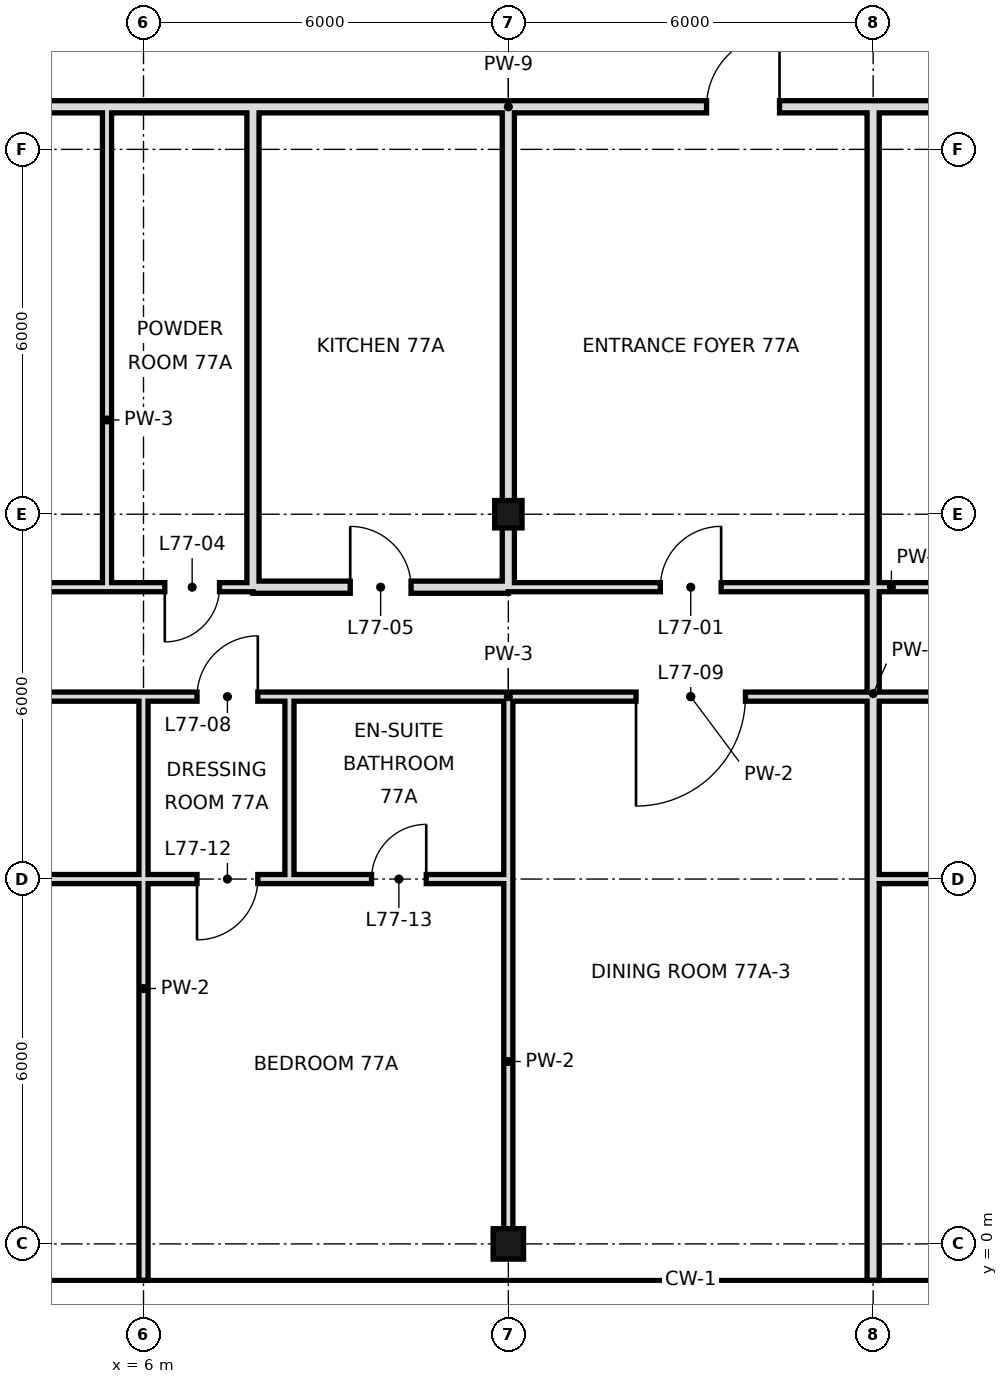
"""IFC4 building model, lengths in metres.
Left out: names, types, materials, properties, quantities, classifications, styles, units other than length and angle.
Written with IfcOpenShell. Run it as: python <this file> out.ifc"""

import sys

from ifc_helpers import new_model, si_unit, direction, frame, frame_2d, origin, origin_2d, place, context, subcontext, project, spatial, rectangle, hollow_rectangle, extrude, element, fill, save


model = new_model("IFC4")
c1 = context("Model", 3, precision=1e-05, world=origin(), true_north=direction((0.0, 1.0)))
c2 = subcontext(c1, "Body", "Model", "MODEL_VIEW")
j1 = project(units=[si_unit("LENGTHUNIT", "METRE"), si_unit("PLANEANGLEUNIT", "RADIAN")], contexts=[c1])
p1 = place(None, origin())
s1 = spatial("IfcSite", under=j1, at=p1, CompositionType="ELEMENT")
p2 = place(p1, origin())
s2 = spatial("IfcBuilding", under=s1, at=p2, CompositionType="ELEMENT")
p3 = place(p2, frame((0.0, 0.0, 323.2)))
s3 = spatial("IfcBuildingStorey", under=s2, at=p3, CompositionType="ELEMENT", Elevation=323.2)
p4 = place(p3, frame((12.0, 0.0, 0.0), z_axis=(0.0, 0.0, 1.0), x_axis=(1.0, 0.0, 0.0)))
e1 = element("IfcColumn", 1, at=p4, inside=s3, PredefinedType="COLUMN", context=c2, shape_type="SweptSolid", body=[
    extrude(hollow_rectangle(XDim=0.5, YDim=0.5, WallThickness=0.025, at=origin_2d()), origin(), (0.0, 0.0, 1.0), 3.6),
])
p5 = place(p3, frame((12.0, 12.0, 0.0), z_axis=(0.0, 0.0, 1.0), x_axis=(1.0, 0.0, 0.0)))
e2 = element("IfcColumn", 2, at=p5, inside=s3, PredefinedType="COLUMN", context=c2, shape_type="SweptSolid", body=[
    extrude(hollow_rectangle(XDim=0.45, YDim=0.45, WallThickness=0.022, at=origin_2d()), origin(), (0.0, 0.0, 1.0), 3.6),
])
p6 = place(p3, frame((12.0, 10.8, 0.0), z_axis=(0.0, 0.0, 1.0), x_axis=(0.0, 1.0, 0.0)))
e3 = element("IfcWall", 3, at=p6, inside=s3, PredefinedType="SOLIDWALL", context=c2, shape_type="SweptSolid", body=[
    extrude(rectangle(XDim=7.9, YDim=0.2, at=frame_2d((3.95, 0.0))), origin(), (0.0, 0.0, 1.0), 2.72),
])
p7 = place(p3, frame((12.0, 0.0, 0.0), z_axis=(0.0, 0.0, 1.0), x_axis=(0.0, 1.0, 0.0)))
e4 = element("IfcWall", 4, at=p7, inside=s3, PredefinedType="PARTITIONING", context=c2, shape_type="SweptSolid", body=[
    extrude(rectangle(XDim=6.0, YDim=0.15, at=frame_2d((3.0, 0.0))), origin(), (0.0, 0.0, 1.0), 2.72),
])
p8 = place(p3, frame((12.0, 6.0, 0.0), z_axis=(0.0, 0.0, 1.0), x_axis=(0.0, 1.0, 0.0)))
e5 = element("IfcWall", 5, at=p8, inside=s3, PredefinedType="PARTITIONING", context=c2, shape_type="SweptSolid", body=[
    extrude(rectangle(XDim=3.0, YDim=0.15, at=frame_2d((1.5, 0.0))), origin(), (0.0, 0.0, 1.0), 2.72),
])
p9 = place(p3, frame((18.0, -0.6, 0.0), z_axis=(0.0, 0.0, 1.0), x_axis=(0.0, 1.0, 0.0)))
e6 = element("IfcWall", 6, at=p9, inside=s3, PredefinedType="SOLIDWALL", context=c2, shape_type="SweptSolid", body=[
    extrude(rectangle(XDim=19.3, YDim=0.2, at=frame_2d((9.65, 0.0))), origin(), (0.0, 0.0, 1.0), 2.72),
])
p10 = place(p3, frame((5.4, 10.8, 0.0), z_axis=(0.0, 0.0, 1.0), x_axis=(0.0, 1.0, 0.0)))
e7 = element("IfcWall", 7, at=p10, inside=s3, PredefinedType="PARTITIONING", context=c2, shape_type="SweptSolid", body=[
    extrude(rectangle(XDim=7.9, YDim=0.15, at=frame_2d((3.95, 0.0))), origin(), (0.0, 0.0, 1.0), 3.42),
])
p11 = place(p3, frame((6.0, -0.6, 0.0), z_axis=(0.0, 0.0, 1.0), x_axis=(0.0, 1.0, 0.0)))
e8 = element("IfcWall", 8, at=p11, inside=s3, PredefinedType="PARTITIONING", context=c2, shape_type="SweptSolid", body=[
    extrude(rectangle(XDim=9.6, YDim=0.15, at=frame_2d((4.8, 0.0))), origin(), (0.0, 0.0, 1.0), 2.72),
])
p12 = place(p3, frame((7.8, 10.8, 0.0), z_axis=(0.0, 0.0, 1.0), x_axis=(0.0, 1.0, 0.0)))
e9 = element("IfcWall", 9, at=p12, inside=s3, PredefinedType="SOLIDWALL", context=c2, shape_type="SweptSolid", body=[
    extrude(rectangle(XDim=7.9, YDim=0.2, at=frame_2d((3.95, 0.0))), origin(), (0.0, 0.0, 1.0), 2.72),
])
p13 = place(p3, frame((8.4, 6.0, 0.0), z_axis=(0.0, 0.0, 1.0), x_axis=(0.0, 1.0, 0.0)))
e10 = element("IfcWall", 10, at=p13, inside=s3, PredefinedType="PARTITIONING", context=c2, shape_type="SweptSolid", body=[
    extrude(rectangle(XDim=3.0, YDim=0.15, at=frame_2d((1.5, 0.0))), origin(), (0.0, 0.0, 1.0), 3.42),
])
p14 = place(p3, frame((7.8, 10.8, 0.0), z_axis=(0.0, 0.0, 1.0), x_axis=(1.0, 0.0, 0.0)))
e11 = element("IfcWall", 11, at=p14, inside=s3, PredefinedType="SOLIDWALL", context=c2, shape_type="SweptSolid", body=[
    extrude(rectangle(XDim=4.2, YDim=0.2, at=frame_2d((2.1, 0.0))), origin(), (0.0, 0.0, 1.0), 2.72),
])
p15 = place(p14, frame((1.6, 0.0, 0.0)))
e12 = element("IfcOpeningElement", 12, at=p15, cuts=e11, PredefinedType="OPENING", context=c2, shape_type="SweptSolid", body=[
    extrude(rectangle(XDim=1.0, YDim=2.4, at=frame_2d((0.5, 1.2))), frame((0.0, 0.11, 0.0), z_axis=(0.0, -1.0, 0.0), x_axis=(1.0, 0.0, 0.0)), (0.0, 0.0, 1.0), 0.22),
])
p16 = place(p3, frame((-18.6, 10.8, 0.0), z_axis=(0.0, 0.0, 1.0), x_axis=(1.0, 0.0, 0.0)))
e13 = element("IfcWall", 13, at=p16, inside=s3, PredefinedType="PARTITIONING", context=c2, shape_type="SweptSolid", body=[
    extrude(rectangle(XDim=24.0, YDim=0.15, at=frame_2d((12.0, 0.0))), origin(), (0.0, 0.0, 1.0), 3.42),
])
p17 = place(p16, frame((10.75, 0.0, 0.0)))
e14 = element("IfcOpeningElement", 14, at=p17, cuts=e13, PredefinedType="OPENING", context=c2, shape_type="SweptSolid", body=[
    extrude(rectangle(XDim=1.0, YDim=2.4, at=frame_2d((0.5, 1.2))), frame((0.0, 0.085, 0.0), z_axis=(0.0, -1.0, 0.0), x_axis=(1.0, 0.0, 0.0)), (0.0, 0.0, 1.0), 0.17),
])
p18 = place(p16, frame((15.4, 0.0, 0.0)))
e15 = element("IfcOpeningElement", 15, at=p18, cuts=e13, PredefinedType="OPENING", context=c2, shape_type="SweptSolid", body=[
    extrude(rectangle(XDim=1.0, YDim=2.4, at=frame_2d((0.5, 1.2))), frame((0.0, 0.085, 0.0), z_axis=(0.0, -1.0, 0.0), x_axis=(1.0, 0.0, 0.0)), (0.0, 0.0, 1.0), 0.17),
])
p19 = place(p3, frame((12.0, 10.8, 0.0), z_axis=(0.0, 0.0, 1.0), x_axis=(1.0, 0.0, 0.0)))
e16 = element("IfcWall", 16, at=p19, inside=s3, PredefinedType="PARTITIONING", context=c2, shape_type="SweptSolid", body=[
    extrude(rectangle(XDim=12.6, YDim=0.15, at=frame_2d((6.3, 0.0))), origin(), (0.0, 0.0, 1.0), 3.42),
])
p20 = place(p19, frame((2.5, 0.0, 0.0)))
e17 = element("IfcOpeningElement", 17, at=p20, cuts=e16, PredefinedType="OPENING", context=c2, shape_type="SweptSolid", body=[
    extrude(rectangle(XDim=1.0, YDim=2.4, at=frame_2d((0.5, 1.2))), frame((0.0, 0.085, 0.0), z_axis=(0.0, -1.0, 0.0), x_axis=(1.0, 0.0, 0.0)), (0.0, 0.0, 1.0), 0.17),
])
p21 = place(p19, frame((9.82, 0.0, 0.0)))
e18 = element("IfcOpeningElement", 18, at=p21, cuts=e16, PredefinedType="OPENING", context=c2, shape_type="SweptSolid", body=[
    extrude(rectangle(XDim=1.0, YDim=2.4, at=frame_2d((0.5, 1.2))), frame((0.0, 0.085, 0.0), z_axis=(0.0, -1.0, 0.0), x_axis=(1.0, 0.0, 0.0)), (0.0, 0.0, 1.0), 0.17),
])
p22 = place(p3, frame((5.4, 10.8, 0.0), z_axis=(0.0, 0.0, 1.0), x_axis=(1.0, 0.0, 0.0)))
e19 = element("IfcWall", 19, at=p22, inside=s3, PredefinedType="PARTITIONING", context=c2, shape_type="SweptSolid", body=[
    extrude(rectangle(XDim=2.4, YDim=0.15, at=frame_2d((1.2, 0.0))), origin(), (0.0, 0.0, 1.0), 3.42),
])
p23 = place(p22, frame((0.95, 0.0, 0.0)))
e20 = element("IfcOpeningElement", 20, at=p23, cuts=e19, PredefinedType="OPENING", context=c2, shape_type="SweptSolid", body=[
    extrude(rectangle(XDim=0.9, YDim=2.4, at=frame_2d((0.45, 1.2))), frame((0.0, 0.085, 0.0), z_axis=(0.0, -1.0, 0.0), x_axis=(1.0, 0.0, 0.0)), (0.0, 0.0, 1.0), 0.17),
])
p24 = place(p3, frame((3.1, 18.7, 0.0), z_axis=(0.0, 0.0, 1.0), x_axis=(1.0, 0.0, 0.0)))
e21 = element("IfcWall", 21, at=p24, inside=s3, PredefinedType="SOLIDWALL", context=c2, shape_type="SweptSolid", body=[
    extrude(rectangle(XDim=4.7, YDim=0.2, at=frame_2d((2.35, 0.0))), origin(), (0.0, 0.0, 1.0), 2.72),
])
p25 = place(p3, frame((12.0, 18.7, 0.0), z_axis=(0.0, 0.0, 1.0), x_axis=(1.0, 0.0, 0.0)))
e22 = element("IfcWall", 22, at=p25, inside=s3, PredefinedType="SOLIDWALL", context=c2, shape_type="SweptSolid", body=[
    extrude(rectangle(XDim=15.0, YDim=0.2, at=frame_2d((7.5, 0.0))), origin(), (0.0, 0.0, 1.0), 2.72),
])
p26 = place(p25, frame((3.26, 0.0, 0.0)))
e23 = element("IfcOpeningElement", 23, at=p26, cuts=e22, PredefinedType="OPENING", context=c2, shape_type="SweptSolid", body=[
    extrude(rectangle(XDim=1.2, YDim=2.4, at=frame_2d((0.6, 1.2))), frame((0.0, 0.11, 0.0), z_axis=(0.0, -1.0, 0.0), x_axis=(1.0, 0.0, 0.0)), (0.0, 0.0, 1.0), 0.22),
])
p27 = place(p3, frame((7.8, 18.7, 0.0), z_axis=(0.0, 0.0, 1.0), x_axis=(1.0, 0.0, 0.0)))
e24 = element("IfcWall", 24, at=p27, inside=s3, PredefinedType="SOLIDWALL", context=c2, shape_type="SweptSolid", body=[
    extrude(rectangle(XDim=4.2, YDim=0.2, at=frame_2d((2.1, 0.0))), origin(), (0.0, 0.0, 1.0), 3.42),
])
p28 = place(p3, frame((-18.0, 6.0, 0.0), z_axis=(0.0, 0.0, 1.0), x_axis=(1.0, 0.0, 0.0)))
e25 = element("IfcWall", 25, at=p28, inside=s3, PredefinedType="PARTITIONING", context=c2, shape_type="SweptSolid", body=[
    extrude(rectangle(XDim=26.4, YDim=0.15, at=frame_2d((13.2, 0.0))), origin(), (0.0, 0.0, 1.0), 2.72),
])
p29 = place(p28, frame((9.95, 0.0, 0.0)))
e26 = element("IfcOpeningElement", 26, at=p29, cuts=e25, PredefinedType="OPENING", context=c2, shape_type="SweptSolid", body=[
    extrude(rectangle(XDim=1.8, YDim=2.4, at=frame_2d((0.9, 1.2))), frame((0.0, 0.085, 0.0), z_axis=(0.0, -1.0, 0.0), x_axis=(1.0, 0.0, 0.0)), (0.0, 0.0, 1.0), 0.17),
])
p30 = place(p28, frame((19.04, 0.0, 0.0)))
e27 = element("IfcOpeningElement", 27, at=p30, cuts=e25, PredefinedType="OPENING", context=c2, shape_type="SweptSolid", body=[
    extrude(rectangle(XDim=1.8, YDim=2.4, at=frame_2d((0.9, 1.2))), frame((0.0, 0.085, 0.0), z_axis=(0.0, -1.0, 0.0), x_axis=(1.0, 0.0, 0.0)), (0.0, 0.0, 1.0), 0.17),
])
p31 = place(p28, frame((24.88, 0.0, 0.0)))
e28 = element("IfcOpeningElement", 28, at=p31, cuts=e25, PredefinedType="OPENING", context=c2, shape_type="SweptSolid", body=[
    extrude(rectangle(XDim=1.0, YDim=2.4, at=frame_2d((0.5, 1.2))), frame((0.0, 0.085, 0.0), z_axis=(0.0, -1.0, 0.0), x_axis=(1.0, 0.0, 0.0)), (0.0, 0.0, 1.0), 0.17),
])
p32 = place(p3, frame((8.4, 6.0, 0.0), z_axis=(0.0, 0.0, 1.0), x_axis=(1.0, 0.0, 0.0)))
e29 = element("IfcWall", 29, at=p32, inside=s3, PredefinedType="PARTITIONING", context=c2, shape_type="SweptSolid", body=[
    extrude(rectangle(XDim=3.6, YDim=0.15, at=frame_2d((1.8, 0.0))), origin(), (0.0, 0.0, 1.0), 2.97),
])
p33 = place(p32, frame((1.35, 0.0, 0.0)))
e30 = element("IfcOpeningElement", 30, at=p33, cuts=e29, PredefinedType="OPENING", context=c2, shape_type="SweptSolid", body=[
    extrude(rectangle(XDim=0.9, YDim=2.4, at=frame_2d((0.45, 1.2))), frame((0.0, 0.085, 0.0), z_axis=(0.0, -1.0, 0.0), x_axis=(1.0, 0.0, 0.0)), (0.0, 0.0, 1.0), 0.17),
])
p34 = place(p3, frame((18.0, 6.0, 0.0), z_axis=(0.0, 0.0, 1.0), x_axis=(1.0, 0.0, 0.0)))
e31 = element("IfcWall", 31, at=p34, inside=s3, PredefinedType="PARTITIONING", context=c2, shape_type="SweptSolid", body=[
    extrude(rectangle(XDim=8.4, YDim=0.15, at=frame_2d((4.2, 0.0))), origin(), (0.0, 0.0, 1.0), 2.97),
])
p35 = place(p34, frame((7.25, 0.0, 0.0)))
e32 = element("IfcOpeningElement", 32, at=p35, cuts=e31, PredefinedType="OPENING", context=c2, shape_type="SweptSolid", body=[
    extrude(rectangle(XDim=0.9, YDim=2.4, at=frame_2d((0.45, 1.2))), frame((0.0, 0.085, 0.0), z_axis=(0.0, -1.0, 0.0), x_axis=(1.0, 0.0, 0.0)), (0.0, 0.0, 1.0), 0.17),
])
p36 = place(p3, frame((-18.6, 9.0, 0.0), z_axis=(0.0, 0.0, 1.0), x_axis=(1.0, 0.0, 0.0)))
e33 = element("IfcWall", 33, at=p36, inside=s3, PredefinedType="PARTITIONING", context=c2, shape_type="SweptSolid", body=[
    extrude(rectangle(XDim=27.0, YDim=0.15, at=frame_2d((13.5, 0.0))), origin(), (0.0, 0.0, 1.0), 3.42),
])
p37 = place(p36, frame((10.55, 0.0, 0.0)))
e34 = element("IfcOpeningElement", 34, at=p37, cuts=e33, PredefinedType="OPENING", context=c2, shape_type="SweptSolid", body=[
    extrude(rectangle(XDim=1.8, YDim=2.4, at=frame_2d((0.9, 1.2))), frame((0.0, 0.085, 0.0), z_axis=(0.0, -1.0, 0.0), x_axis=(1.0, 0.0, 0.0)), (0.0, 0.0, 1.0), 0.17),
])
p38 = place(p36, frame((15.76, 0.0, 0.0)))
e35 = element("IfcOpeningElement", 35, at=p38, cuts=e33, PredefinedType="OPENING", context=c2, shape_type="SweptSolid", body=[
    extrude(rectangle(XDim=1.8, YDim=2.4, at=frame_2d((0.9, 1.2))), frame((0.0, 0.085, 0.0), z_axis=(0.0, -1.0, 0.0), x_axis=(1.0, 0.0, 0.0)), (0.0, 0.0, 1.0), 0.17),
])
p39 = place(p36, frame((25.48, 0.0, 0.0)))
e36 = element("IfcOpeningElement", 36, at=p39, cuts=e33, PredefinedType="OPENING", context=c2, shape_type="SweptSolid", body=[
    extrude(rectangle(XDim=1.0, YDim=2.4, at=frame_2d((0.5, 1.2))), frame((0.0, 0.085, 0.0), z_axis=(0.0, -1.0, 0.0), x_axis=(1.0, 0.0, 0.0)), (0.0, 0.0, 1.0), 0.17),
])
p40 = place(p3, frame((12.0, 9.0, 0.0), z_axis=(0.0, 0.0, 1.0), x_axis=(1.0, 0.0, 0.0)))
e37 = element("IfcWall", 37, at=p40, inside=s3, PredefinedType="PARTITIONING", context=c2, shape_type="SweptSolid", body=[
    extrude(rectangle(XDim=6.0, YDim=0.15, at=frame_2d((3.0, 0.0))), origin(), (0.0, 0.0, 1.0), 3.42),
])
p41 = place(p40, frame((2.1, 0.0, 0.0)))
e38 = element("IfcOpeningElement", 38, at=p41, cuts=e37, PredefinedType="OPENING", context=c2, shape_type="SweptSolid", body=[
    extrude(rectangle(XDim=1.8, YDim=2.4, at=frame_2d((0.9, 1.2))), frame((0.0, 0.085, 0.0), z_axis=(0.0, -1.0, 0.0), x_axis=(1.0, 0.0, 0.0)), (0.0, 0.0, 1.0), 0.17),
])
p42 = place(p3, frame((8.4, 9.0, 0.0), z_axis=(0.0, 0.0, 1.0), x_axis=(1.0, 0.0, 0.0)))
e39 = element("IfcWall", 39, at=p42, inside=s3, PredefinedType="PARTITIONING", context=c2, shape_type="SweptSolid", body=[
    extrude(rectangle(XDim=3.6, YDim=0.15, at=frame_2d((1.8, 0.0))), origin(), (0.0, 0.0, 1.0), 3.42),
])
p43 = place(p3, frame((18.0, 9.0, 0.0), z_axis=(0.0, 0.0, 1.0), x_axis=(1.0, 0.0, 0.0)))
e40 = element("IfcWall", 40, at=p43, inside=s3, PredefinedType="PARTITIONING", context=c2, shape_type="SweptSolid", body=[
    extrude(rectangle(XDim=8.4, YDim=0.15, at=frame_2d((4.2, 0.0))), origin(), (0.0, 0.0, 1.0), 3.42),
])
p44 = place(p20, frame((1.0, 0.0, 0.0), z_axis=(0.0, 0.0, 1.0), x_axis=(-1.0, 0.0, 0.0)))
e41 = element("IfcDoor", 41, at=p44, inside=s3, OperationType="SINGLE_SWING_LEFT", PredefinedType="DOOR", context=c2, shape_type="SweptSolid", body=[
    extrude(rectangle(XDim=1.0, YDim=2.4, at=frame_2d((0.5, 1.2))), frame((0.0, 0.025, 0.0), z_axis=(0.0, -1.0, 0.0), x_axis=(1.0, 0.0, 0.0)), (0.0, 0.0, 1.0), 0.05),
])
fill(e17, e41)
p45 = place(p23, frame((0.9, 0.0, 0.0), z_axis=(0.0, 0.0, 1.0), x_axis=(-1.0, 0.0, 0.0)))
e42 = element("IfcDoor", 42, at=p45, inside=s3, OperationType="SINGLE_SWING_RIGHT", PredefinedType="DOOR", context=c2, shape_type="SweptSolid", body=[
    extrude(rectangle(XDim=0.9, YDim=2.4, at=frame_2d((0.45, 1.2))), frame((0.0, 0.025, 0.0), z_axis=(0.0, -1.0, 0.0), x_axis=(1.0, 0.0, 0.0)), (0.0, 0.0, 1.0), 0.05),
])
fill(e20, e42)
p46 = place(p15, origin())
e43 = element("IfcDoor", 43, at=p46, inside=s3, OperationType="SINGLE_SWING_LEFT", PredefinedType="DOOR", context=c2, shape_type="SweptSolid", body=[
    extrude(rectangle(XDim=1.0, YDim=2.4, at=frame_2d((0.5, 1.2))), frame((0.0, 0.025, 0.0), z_axis=(0.0, -1.0, 0.0), x_axis=(1.0, 0.0, 0.0)), (0.0, 0.0, 1.0), 0.05),
])
fill(e12, e43)
p47 = place(p39, frame((1.0, 0.0, 0.0), z_axis=(0.0, 0.0, 1.0), x_axis=(-1.0, 0.0, 0.0)))
e44 = element("IfcDoor", 44, at=p47, inside=s3, OperationType="SINGLE_SWING_LEFT", PredefinedType="DOOR", context=c2, shape_type="SweptSolid", body=[
    extrude(rectangle(XDim=1.0, YDim=2.4, at=frame_2d((0.5, 1.2))), frame((0.0, 0.025, 0.0), z_axis=(0.0, -1.0, 0.0), x_axis=(1.0, 0.0, 0.0)), (0.0, 0.0, 1.0), 0.05),
])
fill(e36, e44)
p48 = place(p41, frame((1.8, 0.0, 0.0), z_axis=(0.0, 0.0, 1.0), x_axis=(-1.0, 0.0, 0.0)))
e45 = element("IfcDoor", 45, at=p48, inside=s3, OperationType="SINGLE_SWING_RIGHT", PredefinedType="DOOR", context=c2, shape_type="SweptSolid", body=[
    extrude(rectangle(XDim=1.8, YDim=2.4, at=frame_2d((0.9, 1.2))), frame((0.0, 0.025, 0.0), z_axis=(0.0, -1.0, 0.0), x_axis=(1.0, 0.0, 0.0)), (0.0, 0.0, 1.0), 0.05),
])
fill(e38, e45)
p49 = place(p31, frame((1.0, 0.0, 0.0), z_axis=(0.0, 0.0, 1.0), x_axis=(-1.0, 0.0, 0.0)))
e46 = element("IfcDoor", 46, at=p49, inside=s3, OperationType="SINGLE_SWING_RIGHT", PredefinedType="DOOR", context=c2, shape_type="SweptSolid", body=[
    extrude(rectangle(XDim=1.0, YDim=2.4, at=frame_2d((0.5, 1.2))), frame((0.0, 0.025, 0.0), z_axis=(0.0, -1.0, 0.0), x_axis=(1.0, 0.0, 0.0)), (0.0, 0.0, 1.0), 0.05),
])
fill(e28, e46)
p50 = place(p33, frame((0.9, 0.0, 0.0), z_axis=(0.0, 0.0, 1.0), x_axis=(-1.0, 0.0, 0.0)))
e47 = element("IfcDoor", 47, at=p50, inside=s3, OperationType="SINGLE_SWING_LEFT", PredefinedType="DOOR", context=c2, shape_type="SweptSolid", body=[
    extrude(rectangle(XDim=0.9, YDim=2.4, at=frame_2d((0.45, 1.2))), frame((0.0, 0.025, 0.0), z_axis=(0.0, -1.0, 0.0), x_axis=(1.0, 0.0, 0.0)), (0.0, 0.0, 1.0), 0.05),
])
fill(e30, e47)
p51 = place(p26, frame((1.2, 0.0, 0.0), z_axis=(0.0, 0.0, 1.0), x_axis=(-1.0, 0.0, 0.0)))
e48 = element("IfcDoor", 48, at=p51, inside=s3, OperationType="SINGLE_SWING_LEFT", PredefinedType="DOOR", context=c2, shape_type="SweptSolid", body=[
    extrude(rectangle(XDim=1.2, YDim=2.4, at=frame_2d((0.6, 1.2))), frame((0.0, 0.025, 0.0), z_axis=(0.0, -1.0, 0.0), x_axis=(1.0, 0.0, 0.0)), (0.0, 0.0, 1.0), 0.05),
])
fill(e23, e48)
save(model, sys.argv[1])
